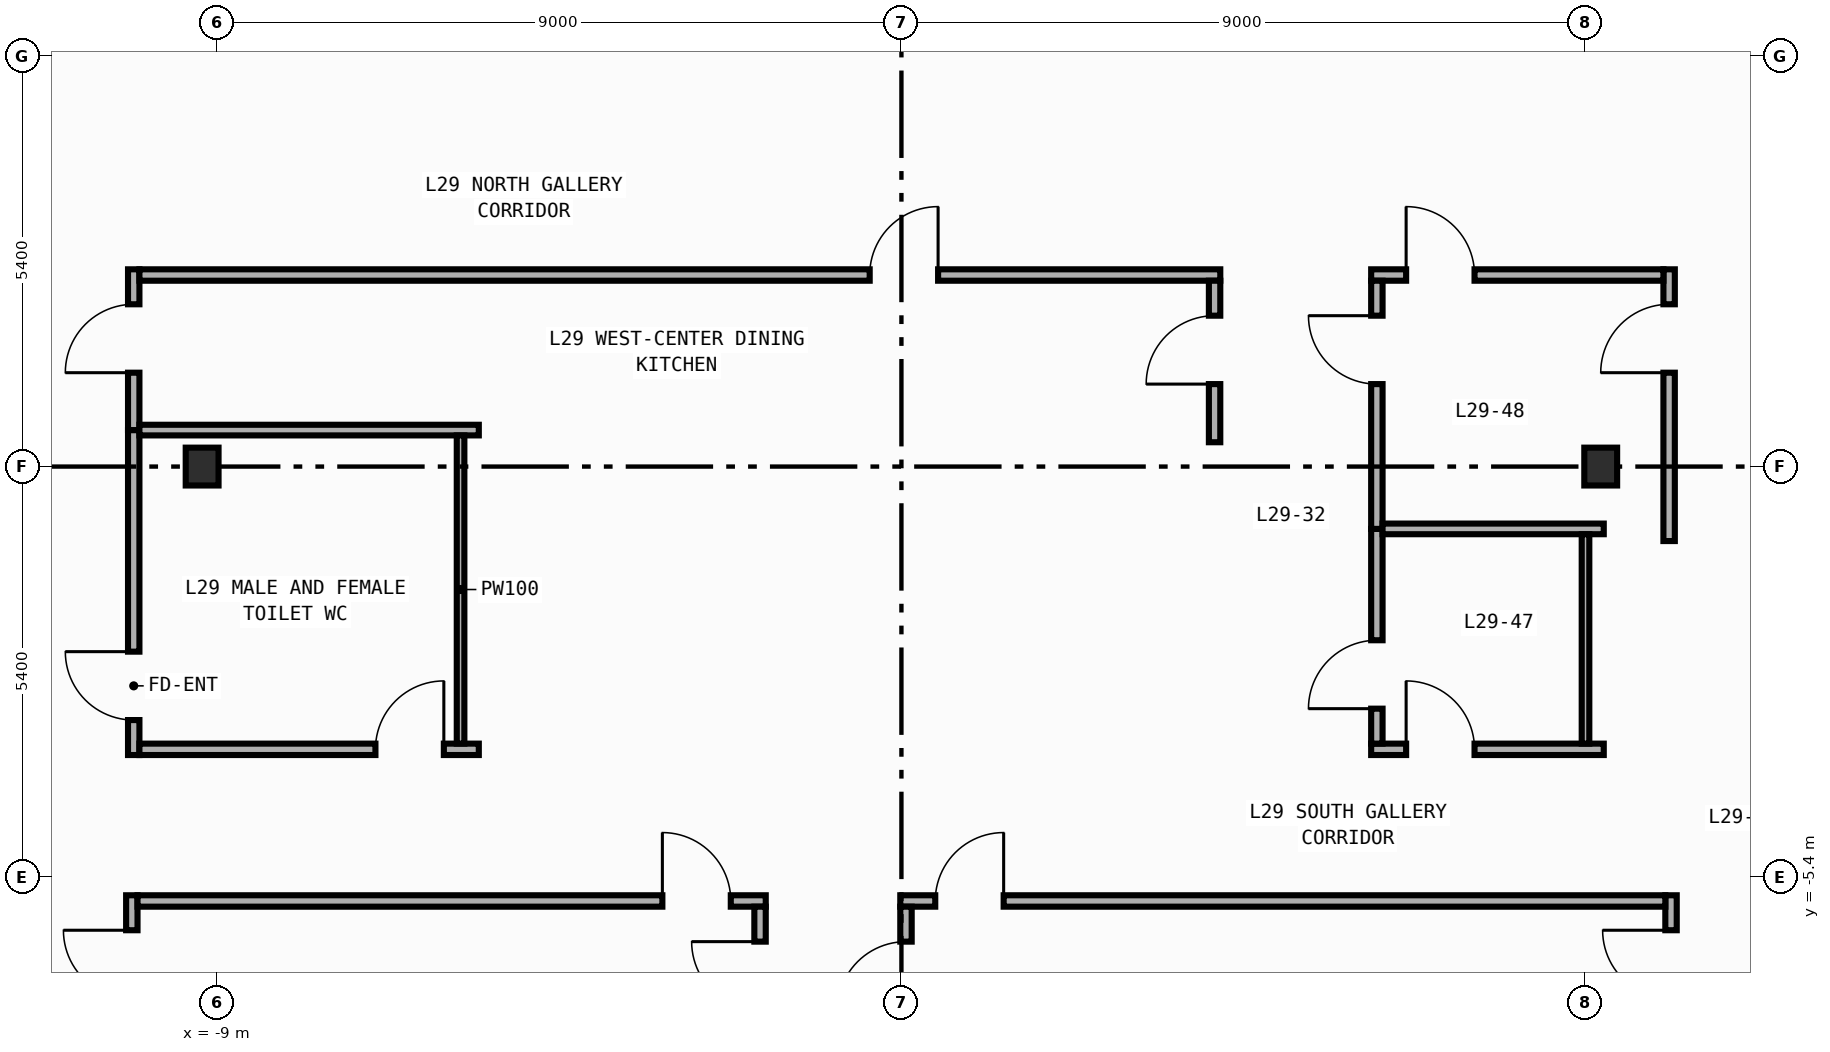
"""IFC4 building model, lengths in metres.
Left out: names, types, materials, properties, quantities, classifications, styles, units other than length and angle.
Written with IfcOpenShell. Run it as: python <this file> out.ifc"""

import sys

from ifc_helpers import new_model, si_unit, direction, frame, frame_2d, origin, origin_2d, place, context, subcontext, project, spatial, rectangle, i_section, extrude, element, fill, save


model = new_model("IFC4")
c1 = context("Model", 3, precision=1e-05, world=origin(), true_north=direction((0.0, 1.0)))
c2 = subcontext(c1, "Body", "Model", "MODEL_VIEW")
j1 = project(units=[si_unit("LENGTHUNIT", "METRE"), si_unit("PLANEANGLEUNIT", "RADIAN")], contexts=[c1])
p1 = place(None, origin())
s1 = spatial("IfcSite", under=j1, at=p1, CompositionType="ELEMENT")
p2 = place(p1, origin())
s2 = spatial("IfcBuilding", under=s1, at=p2, CompositionType="ELEMENT")
p3 = place(p2, frame((0.0, 0.0, 126.8)))
s3 = spatial("IfcBuildingStorey", under=s2, at=p3, CompositionType="ELEMENT", Elevation=126.8)
for number, where, z_axis, x_axis in (
    (1, (-9.2, 0.0, 0.0), (0.0, 0.0, 1.0), (1.0, 0.0, 0.0)),
    (2, (9.2, 0.0, 0.0), (0.0, 0.0, 1.0), (1.0, 0.0, 0.0)),
):
    element("IfcColumn", number, at=place(p3, frame(where, z_axis=z_axis, x_axis=x_axis)), inside=s3, PredefinedType="COLUMN", context=c2, shape_type="SweptSolid", body=[
        extrude(i_section(OverallWidth=0.432, OverallDepth=0.498, WebThickness=0.045, FlangeThickness=0.07, FilletRadius=0.022, at=origin_2d()), origin(), (0.0, 0.0, 1.0), 4.2),
    ])
p4 = place(p3, frame((-10.1, -3.795, 0.0), z_axis=(0.0, 0.0, 1.0), x_axis=(0.0, 1.0, 0.0)))
e3 = element("IfcWall", 3, at=p4, inside=s3, PredefinedType="PARTITIONING", context=c2, shape_type="SweptSolid", body=[
    extrude(rectangle(XDim=4.275, YDim=0.15, at=frame_2d((2.137, 0.0))), origin(), (0.0, 0.0, 1.0), 3.94),
])
p5 = place(p4, frame((0.46, 0.0, 0.0)))
e4 = element("IfcOpeningElement", 4, at=p5, cuts=e3, PredefinedType="OPENING", context=c2, shape_type="SweptSolid", body=[
    extrude(rectangle(XDim=0.9, YDim=2.15, at=frame_2d((0.45, 1.075))), frame((0.0, 0.085, 0.0), z_axis=(0.0, -1.0, 0.0), x_axis=(1.0, 0.0, 0.0)), (0.0, 0.0, 1.0), 0.17),
])
p6 = place(p3, frame((-10.1, 0.48, 0.0), z_axis=(0.0, 0.0, 1.0), x_axis=(0.0, 1.0, 0.0)))
e5 = element("IfcWall", 5, at=p6, inside=s3, PredefinedType="PARTITIONING", context=c2, shape_type="SweptSolid", body=[
    extrude(rectangle(XDim=2.115, YDim=0.15, at=frame_2d((1.058, 0.0))), origin(), (0.0, 0.0, 1.0), 3.94),
])
p7 = place(p6, frame((0.755, 0.0, 0.0)))
e6 = element("IfcOpeningElement", 6, at=p7, cuts=e5, PredefinedType="OPENING", context=c2, shape_type="SweptSolid", body=[
    extrude(rectangle(XDim=0.9, YDim=2.15, at=frame_2d((0.45, 1.075))), frame((0.0, 0.085, 0.0), z_axis=(0.0, -1.0, 0.0), x_axis=(1.0, 0.0, 0.0)), (0.0, 0.0, 1.0), 0.17),
])
p8 = place(p3, frame((-10.125, -12.44, 0.0), z_axis=(0.0, 0.0, 1.0), x_axis=(0.0, 1.0, 0.0)))
e7 = element("IfcWall", 7, at=p8, inside=s3, PredefinedType="PARTITIONING", context=c2, shape_type="SweptSolid", body=[
    extrude(rectangle(XDim=6.8, YDim=0.15, at=frame_2d((3.4, 0.0))), origin(), (0.0, 0.0, 1.0), 3.94),
])
p9 = place(p8, frame((5.44, 0.0, 0.0)))
e8 = element("IfcOpeningElement", 8, at=p9, cuts=e7, PredefinedType="OPENING", context=c2, shape_type="SweptSolid", body=[
    extrude(rectangle(XDim=0.9, YDim=2.15, at=frame_2d((0.45, 1.075))), frame((0.0, 0.085, 0.0), z_axis=(0.0, -1.0, 0.0), x_axis=(1.0, 0.0, 0.0)), (0.0, 0.0, 1.0), 0.17),
])
p10 = place(p3, frame((10.1, -0.98, 0.0), z_axis=(0.0, 0.0, 1.0), x_axis=(0.0, 1.0, 0.0)))
e9 = element("IfcWall", 9, at=p10, inside=s3, PredefinedType="PARTITIONING", context=c2, shape_type="SweptSolid", body=[
    extrude(rectangle(XDim=3.575, YDim=0.15, at=frame_2d((1.788, 0.0))), origin(), (0.0, 0.0, 1.0), 3.94),
])
p11 = place(p10, frame((2.215, 0.0, 0.0)))
e10 = element("IfcOpeningElement", 10, at=p11, cuts=e9, PredefinedType="OPENING", context=c2, shape_type="SweptSolid", body=[
    extrude(rectangle(XDim=0.9, YDim=2.15, at=frame_2d((0.45, 1.075))), frame((0.0, 0.085, 0.0), z_axis=(0.0, -1.0, 0.0), x_axis=(1.0, 0.0, 0.0)), (0.0, 0.0, 1.0), 0.17),
])
p12 = place(p3, frame((10.125, -14.44, 0.0), z_axis=(0.0, 0.0, 1.0), x_axis=(0.0, 1.0, 0.0)))
e11 = element("IfcWall", 11, at=p12, inside=s3, PredefinedType="PARTITIONING", context=c2, shape_type="SweptSolid", body=[
    extrude(rectangle(XDim=8.8, YDim=0.15, at=frame_2d((4.4, 0.0))), origin(), (0.0, 0.0, 1.0), 3.94),
])
p13 = place(p12, frame((7.44, 0.0, 0.0)))
e12 = element("IfcOpeningElement", 12, at=p13, cuts=e11, PredefinedType="OPENING", context=c2, shape_type="SweptSolid", body=[
    extrude(rectangle(XDim=0.9, YDim=2.15, at=frame_2d((0.45, 1.075))), frame((0.0, 0.085, 0.0), z_axis=(0.0, -1.0, 0.0), x_axis=(1.0, 0.0, 0.0)), (0.0, 0.0, 1.0), 0.17),
])
p14 = place(p3, frame((6.18, 2.52, 0.0), z_axis=(0.0, 0.0, 1.0), x_axis=(1.0, 0.0, 0.0)))
e13 = element("IfcWall", 13, at=p14, inside=s3, PredefinedType="PARTITIONING", context=c2, shape_type="SweptSolid", body=[
    extrude(rectangle(XDim=3.845, YDim=0.15, at=frame_2d((1.922, 0.0))), origin(), (0.0, 0.0, 1.0), 3.94),
])
p15 = place(p14, frame((0.46, 0.0, 0.0)))
e14 = element("IfcOpeningElement", 14, at=p15, cuts=e13, PredefinedType="OPENING", context=c2, shape_type="SweptSolid", body=[
    extrude(rectangle(XDim=0.9, YDim=2.15, at=frame_2d((0.45, 1.075))), frame((0.0, 0.085, 0.0), z_axis=(0.0, -1.0, 0.0), x_axis=(1.0, 0.0, 0.0)), (0.0, 0.0, 1.0), 0.17),
])
p16 = place(p3, frame((-10.025, 2.52, 0.0), z_axis=(0.0, 0.0, 1.0), x_axis=(1.0, 0.0, 0.0)))
e15 = element("IfcWall", 15, at=p16, inside=s3, PredefinedType="PARTITIONING", context=c2, shape_type="SweptSolid", body=[
    extrude(rectangle(XDim=14.22, YDim=0.15, at=frame_2d((7.11, 0.0))), origin(), (0.0, 0.0, 1.0), 3.94),
])
p17 = place(p16, frame((9.607, 0.0, 0.0)))
e16 = element("IfcOpeningElement", 16, at=p17, cuts=e15, PredefinedType="OPENING", context=c2, shape_type="SweptSolid", body=[
    extrude(rectangle(XDim=0.9, YDim=2.15, at=frame_2d((0.45, 1.075))), frame((0.0, 0.085, 0.0), z_axis=(0.0, -1.0, 0.0), x_axis=(1.0, 0.0, 0.0)), (0.0, 0.0, 1.0), 0.17),
])
p18 = place(p3, frame((6.18, -3.72, 0.0), z_axis=(0.0, 0.0, 1.0), x_axis=(1.0, 0.0, 0.0)))
e17 = element("IfcWall", 17, at=p18, inside=s3, PredefinedType="PARTITIONING", context=c2, shape_type="SweptSolid", body=[
    extrude(rectangle(XDim=3.06, YDim=0.15, at=frame_2d((1.53, 0.0))), origin(), (0.0, 0.0, 1.0), 3.94),
])
p19 = place(p18, frame((0.46, 0.0, 0.0)))
e18 = element("IfcOpeningElement", 18, at=p19, cuts=e17, PredefinedType="OPENING", context=c2, shape_type="SweptSolid", body=[
    extrude(rectangle(XDim=0.9, YDim=2.15, at=frame_2d((0.45, 1.075))), frame((0.0, 0.085, 0.0), z_axis=(0.0, -1.0, 0.0), x_axis=(1.0, 0.0, 0.0)), (0.0, 0.0, 1.0), 0.17),
])
p20 = place(p3, frame((-10.025, -3.72, 0.0), z_axis=(0.0, 0.0, 1.0), x_axis=(1.0, 0.0, 0.0)))
e19 = element("IfcWall", 19, at=p20, inside=s3, PredefinedType="PARTITIONING", context=c2, shape_type="SweptSolid", body=[
    extrude(rectangle(XDim=4.465, YDim=0.15, at=frame_2d((2.232, 0.0))), origin(), (0.0, 0.0, 1.0), 3.94),
])
p21 = place(p20, frame((3.105, 0.0, 0.0)))
e20 = element("IfcOpeningElement", 20, at=p21, cuts=e19, PredefinedType="OPENING", context=c2, shape_type="SweptSolid", body=[
    extrude(rectangle(XDim=0.9, YDim=2.15, at=frame_2d((0.45, 1.075))), frame((0.0, 0.085, 0.0), z_axis=(0.0, -1.0, 0.0), x_axis=(1.0, 0.0, 0.0)), (0.0, 0.0, 1.0), 0.17),
])
p22 = place(p3, frame((-10.05, -5.715, 0.0), z_axis=(0.0, 0.0, 1.0), x_axis=(1.0, 0.0, 0.0)))
e21 = element("IfcWall", 21, at=p22, inside=s3, PredefinedType="PARTITIONING", context=c2, shape_type="SweptSolid", body=[
    extrude(rectangle(XDim=8.265, YDim=0.15, at=frame_2d((4.133, 0.0))), origin(), (0.0, 0.0, 1.0), 3.94),
])
p23 = place(p22, frame((6.905, 0.0, 0.0)))
e22 = element("IfcOpeningElement", 22, at=p23, cuts=e21, PredefinedType="OPENING", context=c2, shape_type="SweptSolid", body=[
    extrude(rectangle(XDim=0.9, YDim=2.15, at=frame_2d((0.45, 1.075))), frame((0.0, 0.085, 0.0), z_axis=(0.0, -1.0, 0.0), x_axis=(1.0, 0.0, 0.0)), (0.0, 0.0, 1.0), 0.17),
])
p24 = place(p3, frame((-0.015, -5.715, 0.0), z_axis=(0.0, 0.0, 1.0), x_axis=(1.0, 0.0, 0.0)))
e23 = element("IfcWall", 23, at=p24, inside=s3, PredefinedType="PARTITIONING", context=c2, shape_type="SweptSolid", body=[
    extrude(rectangle(XDim=10.065, YDim=0.15, at=frame_2d((5.032, 0.0))), origin(), (0.0, 0.0, 1.0), 3.94),
])
p25 = place(p24, frame((0.46, 0.0, 0.0)))
e24 = element("IfcOpeningElement", 24, at=p25, cuts=e23, PredefinedType="OPENING", context=c2, shape_type="SweptSolid", body=[
    extrude(rectangle(XDim=0.9, YDim=2.15, at=frame_2d((0.45, 1.075))), frame((0.0, 0.085, 0.0), z_axis=(0.0, -1.0, 0.0), x_axis=(1.0, 0.0, 0.0)), (0.0, 0.0, 1.0), 0.17),
])
p26 = place(p3, frame((6.255, -3.645, 0.0), z_axis=(0.0, 0.0, 1.0), x_axis=(0.0, 1.0, 0.0)))
e25 = element("IfcWall", 25, at=p26, inside=s3, PredefinedType="PARTITIONING", context=c2, shape_type="SweptSolid", body=[
    extrude(rectangle(XDim=2.825, YDim=0.15, at=frame_2d((1.413, 0.0))), origin(), (0.0, 0.0, 1.0), 3.94),
])
p27 = place(p26, frame((0.46, 0.0, 0.0)))
e26 = element("IfcOpeningElement", 26, at=p27, cuts=e25, PredefinedType="OPENING", context=c2, shape_type="SweptSolid", body=[
    extrude(rectangle(XDim=0.9, YDim=2.15, at=frame_2d((0.45, 1.075))), frame((0.0, 0.085, 0.0), z_axis=(0.0, -1.0, 0.0), x_axis=(1.0, 0.0, 0.0)), (0.0, 0.0, 1.0), 0.17),
])
p28 = place(p3, frame((6.255, -0.82, 0.0), z_axis=(0.0, 0.0, 1.0), x_axis=(0.0, 1.0, 0.0)))
e27 = element("IfcWall", 27, at=p28, inside=s3, PredefinedType="PARTITIONING", context=c2, shape_type="SweptSolid", body=[
    extrude(rectangle(XDim=3.265, YDim=0.15, at=frame_2d((1.633, 0.0))), origin(), (0.0, 0.0, 1.0), 3.94),
])
p29 = place(p28, frame((1.905, 0.0, 0.0)))
e28 = element("IfcOpeningElement", 28, at=p29, cuts=e27, PredefinedType="OPENING", context=c2, shape_type="SweptSolid", body=[
    extrude(rectangle(XDim=0.9, YDim=2.15, at=frame_2d((0.45, 1.075))), frame((0.0, 0.085, 0.0), z_axis=(0.0, -1.0, 0.0), x_axis=(1.0, 0.0, 0.0)), (0.0, 0.0, 1.0), 0.17),
])
p30 = place(p3, frame((4.12, 0.32, 0.0), z_axis=(0.0, 0.0, 1.0), x_axis=(0.0, 1.0, 0.0)))
e29 = element("IfcWall", 29, at=p30, inside=s3, PredefinedType="PARTITIONING", context=c2, shape_type="SweptSolid", body=[
    extrude(rectangle(XDim=2.125, YDim=0.15, at=frame_2d((1.062, 0.0))), origin(), (0.0, 0.0, 1.0), 3.94),
])
p31 = place(p30, frame((0.765, 0.0, 0.0)))
e30 = element("IfcOpeningElement", 30, at=p31, cuts=e29, PredefinedType="OPENING", context=c2, shape_type="SweptSolid", body=[
    extrude(rectangle(XDim=0.9, YDim=2.15, at=frame_2d((0.45, 1.075))), frame((0.0, 0.085, 0.0), z_axis=(0.0, -1.0, 0.0), x_axis=(1.0, 0.0, 0.0)), (0.0, 0.0, 1.0), 0.17),
])
p32 = place(p3, frame((-1.86, -14.865, 0.0), z_axis=(0.0, 0.0, 1.0), x_axis=(0.0, 1.0, 0.0)))
e31 = element("IfcWall", 31, at=p32, inside=s3, PredefinedType="PARTITIONING", context=c2, shape_type="SweptSolid", body=[
    extrude(rectangle(XDim=9.075, YDim=0.15, at=frame_2d((4.538, 0.0))), origin(), (0.0, 0.0, 1.0), 3.94),
])
p33 = place(p32, frame((7.715, 0.0, 0.0)))
e32 = element("IfcOpeningElement", 32, at=p33, cuts=e31, PredefinedType="OPENING", context=c2, shape_type="SweptSolid", body=[
    extrude(rectangle(XDim=0.9, YDim=2.15, at=frame_2d((0.45, 1.075))), frame((0.0, 0.085, 0.0), z_axis=(0.0, -1.0, 0.0), x_axis=(1.0, 0.0, 0.0)), (0.0, 0.0, 1.0), 0.17),
])
p34 = place(p3, frame((0.06, -14.865, 0.0), z_axis=(0.0, 0.0, 1.0), x_axis=(0.0, 1.0, 0.0)))
e33 = element("IfcWall", 33, at=p34, inside=s3, PredefinedType="PARTITIONING", context=c2, shape_type="SweptSolid", body=[
    extrude(rectangle(XDim=9.075, YDim=0.15, at=frame_2d((4.538, 0.0))), origin(), (0.0, 0.0, 1.0), 3.94),
])
p35 = place(p34, frame((7.715, 0.0, 0.0)))
e34 = element("IfcOpeningElement", 34, at=p35, cuts=e33, PredefinedType="OPENING", context=c2, shape_type="SweptSolid", body=[
    extrude(rectangle(XDim=0.9, YDim=2.15, at=frame_2d((0.45, 1.075))), frame((0.0, 0.085, 0.0), z_axis=(0.0, -1.0, 0.0), x_axis=(1.0, 0.0, 0.0)), (0.0, 0.0, 1.0), 0.17),
])
p36 = place(p3, frame((6.33, -0.82, 0.0), z_axis=(0.0, 0.0, 1.0), x_axis=(1.0, 0.0, 0.0)))
e35 = element("IfcWall", 35, at=p36, inside=s3, PredefinedType="PARTITIONING", context=c2, shape_type="SweptSolid", body=[
    extrude(rectangle(XDim=2.91, YDim=0.14, at=frame_2d((1.455, 0.0))), origin(), (0.0, 0.0, 1.0), 3.94),
])
p37 = place(p3, frame((-10.025, 0.48, 0.0), z_axis=(0.0, 0.0, 1.0), x_axis=(1.0, 0.0, 0.0)))
e36 = element("IfcWall", 36, at=p37, inside=s3, PredefinedType="PARTITIONING", context=c2, shape_type="SweptSolid", body=[
    extrude(rectangle(XDim=4.465, YDim=0.14, at=frame_2d((2.232, 0.0))), origin(), (0.0, 0.0, 1.0), 3.94),
])
p38 = place(p3, frame((9.0, -0.89, 0.0), z_axis=(0.0, 0.0, 1.0), x_axis=(0.0, -1.0, 0.0)))
e37 = element("IfcWall", 37, at=p38, inside=s3, PredefinedType="PARTITIONING", context=c2, shape_type="SweptSolid", body=[
    extrude(rectangle(XDim=2.755, YDim=0.1, at=frame_2d((1.377, 0.0))), origin(), (0.0, 0.0, 1.0), 3.24),
])
p39 = place(p3, frame((-5.8, 0.41, 0.0), z_axis=(0.0, 0.0, 1.0), x_axis=(0.0, -1.0, 0.0)))
e38 = element("IfcWall", 38, at=p39, inside=s3, PredefinedType="PARTITIONING", context=c2, shape_type="SweptSolid", body=[
    extrude(rectangle(XDim=4.055, YDim=0.1, at=frame_2d((2.027, 0.0))), origin(), (0.0, 0.0, 1.0), 3.94),
])
p40 = place(p5, origin())
e39 = element("IfcDoor", 39, at=p40, inside=s3, OperationType="SINGLE_SWING_RIGHT", PredefinedType="DOOR", context=c2, shape_type="SweptSolid", body=[
    extrude(rectangle(XDim=0.9, YDim=2.15, at=frame_2d((0.45, 1.075))), frame((0.0, 0.025, 0.0), z_axis=(0.0, -1.0, 0.0), x_axis=(1.0, 0.0, 0.0)), (0.0, 0.0, 1.0), 0.05),
])
fill(e4, e39)
p41 = place(p7, origin())
e40 = element("IfcDoor", 40, at=p41, inside=s3, OperationType="SINGLE_SWING_LEFT", PredefinedType="DOOR", context=c2, shape_type="SweptSolid", body=[
    extrude(rectangle(XDim=0.9, YDim=2.15, at=frame_2d((0.45, 1.075))), frame((0.0, 0.025, 0.0), z_axis=(0.0, -1.0, 0.0), x_axis=(1.0, 0.0, 0.0)), (0.0, 0.0, 1.0), 0.05),
])
fill(e6, e40)
p42 = place(p9, origin())
e41 = element("IfcDoor", 41, at=p42, inside=s3, OperationType="SINGLE_SWING_RIGHT", PredefinedType="DOOR", context=c2, shape_type="SweptSolid", body=[
    extrude(rectangle(XDim=0.9, YDim=2.15, at=frame_2d((0.45, 1.075))), frame((0.0, 0.025, 0.0), z_axis=(0.0, -1.0, 0.0), x_axis=(1.0, 0.0, 0.0)), (0.0, 0.0, 1.0), 0.05),
])
fill(e8, e41)
p43 = place(p11, origin())
e42 = element("IfcDoor", 42, at=p43, inside=s3, OperationType="SINGLE_SWING_LEFT", PredefinedType="DOOR", context=c2, shape_type="SweptSolid", body=[
    extrude(rectangle(XDim=0.9, YDim=2.15, at=frame_2d((0.45, 1.075))), frame((0.0, 0.025, 0.0), z_axis=(0.0, -1.0, 0.0), x_axis=(1.0, 0.0, 0.0)), (0.0, 0.0, 1.0), 0.05),
])
fill(e10, e42)
p44 = place(p13, origin())
e43 = element("IfcDoor", 43, at=p44, inside=s3, OperationType="SINGLE_SWING_RIGHT", PredefinedType="DOOR", context=c2, shape_type="SweptSolid", body=[
    extrude(rectangle(XDim=0.9, YDim=2.15, at=frame_2d((0.45, 1.075))), frame((0.0, 0.025, 0.0), z_axis=(0.0, -1.0, 0.0), x_axis=(1.0, 0.0, 0.0)), (0.0, 0.0, 1.0), 0.05),
])
fill(e12, e43)
p45 = place(p15, origin())
e44 = element("IfcDoor", 44, at=p45, inside=s3, OperationType="SINGLE_SWING_LEFT", PredefinedType="DOOR", context=c2, shape_type="SweptSolid", body=[
    extrude(rectangle(XDim=0.9, YDim=2.15, at=frame_2d((0.45, 1.075))), frame((0.0, 0.025, 0.0), z_axis=(0.0, -1.0, 0.0), x_axis=(1.0, 0.0, 0.0)), (0.0, 0.0, 1.0), 0.05),
])
fill(e14, e44)
p46 = place(p17, origin())
e45 = element("IfcDoor", 45, at=p46, inside=s3, OperationType="SINGLE_SWING_RIGHT", PredefinedType="DOOR", context=c2, shape_type="SweptSolid", body=[
    extrude(rectangle(XDim=0.9, YDim=2.15, at=frame_2d((0.45, 1.075))), frame((0.0, 0.025, 0.0), z_axis=(0.0, -1.0, 0.0), x_axis=(1.0, 0.0, 0.0)), (0.0, 0.0, 1.0), 0.05),
])
fill(e16, e45)
p47 = place(p19, origin())
e46 = element("IfcDoor", 46, at=p47, inside=s3, OperationType="SINGLE_SWING_LEFT", PredefinedType="DOOR", context=c2, shape_type="SweptSolid", body=[
    extrude(rectangle(XDim=0.9, YDim=2.15, at=frame_2d((0.45, 1.075))), frame((0.0, 0.025, 0.0), z_axis=(0.0, -1.0, 0.0), x_axis=(1.0, 0.0, 0.0)), (0.0, 0.0, 1.0), 0.05),
])
fill(e18, e46)
p48 = place(p21, origin())
e47 = element("IfcDoor", 47, at=p48, inside=s3, OperationType="SINGLE_SWING_RIGHT", PredefinedType="DOOR", context=c2, shape_type="SweptSolid", body=[
    extrude(rectangle(XDim=0.9, YDim=2.15, at=frame_2d((0.45, 1.075))), frame((0.0, 0.025, 0.0), z_axis=(0.0, -1.0, 0.0), x_axis=(1.0, 0.0, 0.0)), (0.0, 0.0, 1.0), 0.05),
])
fill(e20, e47)
p49 = place(p23, origin())
e48 = element("IfcDoor", 48, at=p49, inside=s3, OperationType="SINGLE_SWING_LEFT", PredefinedType="DOOR", context=c2, shape_type="SweptSolid", body=[
    extrude(rectangle(XDim=0.9, YDim=2.15, at=frame_2d((0.45, 1.075))), frame((0.0, 0.025, 0.0), z_axis=(0.0, -1.0, 0.0), x_axis=(1.0, 0.0, 0.0)), (0.0, 0.0, 1.0), 0.05),
])
fill(e22, e48)
p50 = place(p25, origin())
e49 = element("IfcDoor", 49, at=p50, inside=s3, OperationType="SINGLE_SWING_RIGHT", PredefinedType="DOOR", context=c2, shape_type="SweptSolid", body=[
    extrude(rectangle(XDim=0.9, YDim=2.15, at=frame_2d((0.45, 1.075))), frame((0.0, 0.025, 0.0), z_axis=(0.0, -1.0, 0.0), x_axis=(1.0, 0.0, 0.0)), (0.0, 0.0, 1.0), 0.05),
])
fill(e24, e49)
p51 = place(p27, origin())
e50 = element("IfcDoor", 50, at=p51, inside=s3, OperationType="SINGLE_SWING_LEFT", PredefinedType="DOOR", context=c2, shape_type="SweptSolid", body=[
    extrude(rectangle(XDim=0.9, YDim=2.15, at=frame_2d((0.45, 1.075))), frame((0.0, 0.025, 0.0), z_axis=(0.0, -1.0, 0.0), x_axis=(1.0, 0.0, 0.0)), (0.0, 0.0, 1.0), 0.05),
])
fill(e26, e50)
p52 = place(p29, origin())
e51 = element("IfcDoor", 51, at=p52, inside=s3, OperationType="SINGLE_SWING_RIGHT", PredefinedType="DOOR", context=c2, shape_type="SweptSolid", body=[
    extrude(rectangle(XDim=0.9, YDim=2.15, at=frame_2d((0.45, 1.075))), frame((0.0, 0.025, 0.0), z_axis=(0.0, -1.0, 0.0), x_axis=(1.0, 0.0, 0.0)), (0.0, 0.0, 1.0), 0.05),
])
fill(e28, e51)
p53 = place(p31, origin())
e52 = element("IfcDoor", 52, at=p53, inside=s3, OperationType="SINGLE_SWING_LEFT", PredefinedType="DOOR", context=c2, shape_type="SweptSolid", body=[
    extrude(rectangle(XDim=0.9, YDim=2.15, at=frame_2d((0.45, 1.075))), frame((0.0, 0.025, 0.0), z_axis=(0.0, -1.0, 0.0), x_axis=(1.0, 0.0, 0.0)), (0.0, 0.0, 1.0), 0.05),
])
fill(e30, e52)
p54 = place(p33, origin())
e53 = element("IfcDoor", 53, at=p54, inside=s3, OperationType="SINGLE_SWING_RIGHT", PredefinedType="DOOR", context=c2, shape_type="SweptSolid", body=[
    extrude(rectangle(XDim=0.9, YDim=2.15, at=frame_2d((0.45, 1.075))), frame((0.0, 0.025, 0.0), z_axis=(0.0, -1.0, 0.0), x_axis=(1.0, 0.0, 0.0)), (0.0, 0.0, 1.0), 0.05),
])
fill(e32, e53)
p55 = place(p35, origin())
e54 = element("IfcDoor", 54, at=p55, inside=s3, OperationType="SINGLE_SWING_LEFT", PredefinedType="DOOR", context=c2, shape_type="SweptSolid", body=[
    extrude(rectangle(XDim=0.9, YDim=2.15, at=frame_2d((0.45, 1.075))), frame((0.0, 0.025, 0.0), z_axis=(0.0, -1.0, 0.0), x_axis=(1.0, 0.0, 0.0)), (0.0, 0.0, 1.0), 0.05),
])
fill(e34, e54)
save(model, sys.argv[1])
